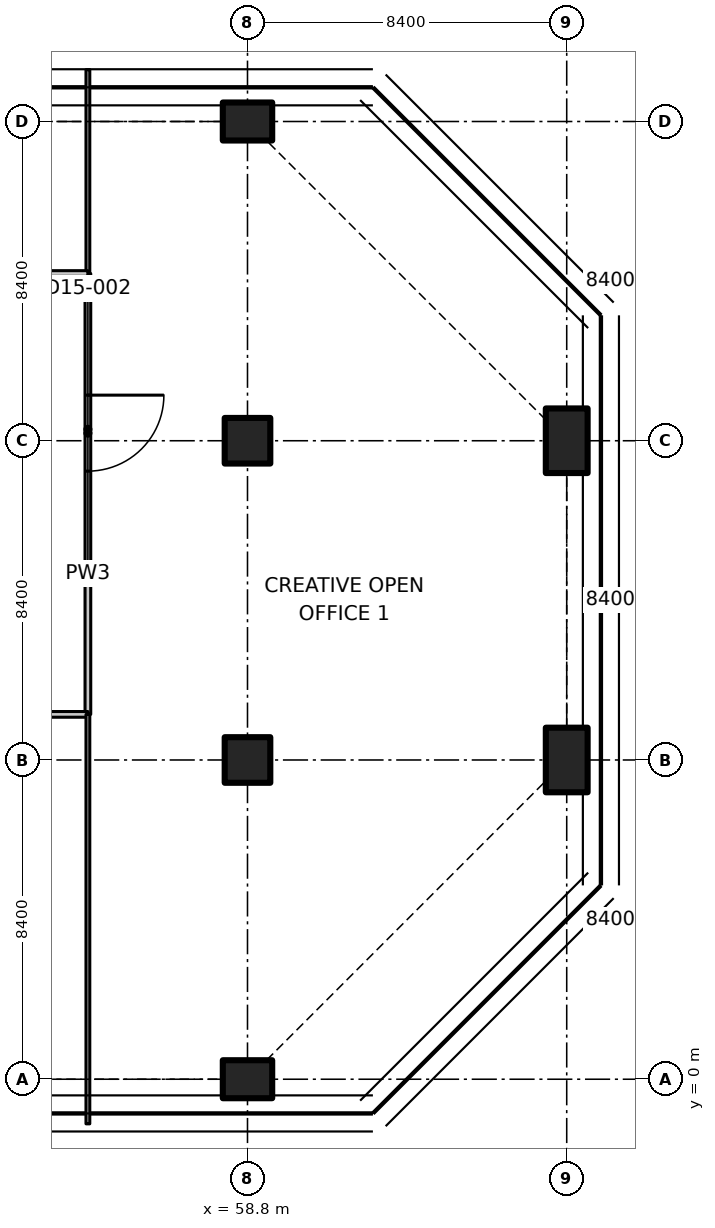
"""IFC4 building model, lengths in metres.
Left out: names, types, materials, properties, quantities, classifications, styles, units other than length and angle.
Written with IfcOpenShell. Run it as: python <this file> out.ifc"""

import sys

from ifc_helpers import new_model, si_unit, direction, frame, frame_2d, origin, origin_2d, place, context, subcontext, project, spatial, polyline, rectangle, outline, extrude, element, fill, save


model = new_model("IFC4")
c1 = context("Model", 3, precision=1e-05, world=origin(), true_north=direction((0.0, 1.0)))
c2 = subcontext(c1, "Body", "Model", "MODEL_VIEW")
j1 = project(units=[si_unit("LENGTHUNIT", "METRE"), si_unit("PLANEANGLEUNIT", "RADIAN")], contexts=[c1])
p1 = place(None, origin())
s1 = spatial("IfcSite", under=j1, at=p1, CompositionType="ELEMENT")
p2 = place(p1, origin())
s2 = spatial("IfcBuilding", under=s1, at=p2, CompositionType="ELEMENT")
p3 = place(p2, frame((0.0, 0.0, 120.5)))
s3 = spatial("IfcBuildingStorey", under=s2, at=p3, CompositionType="ELEMENT", Elevation=120.5)
p4 = place(p3, frame((58.8, 0.0, 0.0), z_axis=(0.0, 0.0, 1.0), x_axis=(0.0, 1.0, 0.0)))
e1 = element("IfcColumn", 1, at=p4, inside=s3, PredefinedType="COLUMN", context=c2, shape_type="SweptSolid", body=[
    extrude(rectangle(XDim=1.0, YDim=1.3, at=origin_2d()), origin(), (0.0, 0.0, 1.0), 3.35),
])
for number, where, z_axis, x_axis in (
    (2, (58.8, 8.4, 0.0), (0.0, 0.0, 1.0), (1.0, 0.0, 0.0)),
    (3, (58.8, 16.8, 0.0), (0.0, 0.0, 1.0), (1.0, 0.0, 0.0)),
):
    element("IfcColumn", number, at=place(p3, frame(where, z_axis=z_axis, x_axis=x_axis)), inside=s3, PredefinedType="COLUMN", context=c2, shape_type="SweptSolid", body=[
        extrude(rectangle(XDim=1.2, YDim=1.2, at=origin_2d()), origin(), (0.0, 0.0, 1.0), 3.35),
    ])
p5 = place(p3, frame((58.8, 25.2, 0.0), z_axis=(0.0, 0.0, 1.0), x_axis=(0.0, 1.0, 0.0)))
e4 = element("IfcColumn", 4, at=p5, inside=s3, PredefinedType="COLUMN", context=c2, shape_type="SweptSolid", body=[
    extrude(rectangle(XDim=1.0, YDim=1.3, at=origin_2d()), origin(), (0.0, 0.0, 1.0), 3.35),
])
for number, where, z_axis, x_axis in (
    (5, (67.2, 8.4, 0.0), (0.0, 0.0, 1.0), (1.0, 0.0, 0.0)),
    (6, (67.2, 16.8, 0.0), (0.0, 0.0, 1.0), (1.0, 0.0, 0.0)),
):
    element("IfcColumn", number, at=place(p3, frame(where, z_axis=z_axis, x_axis=x_axis)), inside=s3, PredefinedType="COLUMN", context=c2, shape_type="SweptSolid", body=[
        extrude(rectangle(XDim=1.1, YDim=1.7, at=origin_2d()), origin(), (0.0, 0.0, 1.0), 3.35),
    ])
p6 = place(p3, frame((54.6, 13.0, 0.0), z_axis=(0.0, 0.0, 1.0), x_axis=(0.0, -1.0, 0.0)))
e7 = element("IfcWall", 7, at=p6, inside=s3, PredefinedType="PARTITIONING", context=c2, shape_type="SweptSolid", body=[
    extrude(rectangle(XDim=3.4, YDim=0.15, at=frame_2d((1.7, 0.0))), origin(), (0.0, 0.0, 1.0), 3.33),
])
p7 = place(p3, frame((54.6, 9.6, 0.0), z_axis=(0.0, 0.0, 1.0), x_axis=(-1.0, 0.0, 0.0)))
e8 = element("IfcWall", 8, at=p7, inside=s3, PredefinedType="PARTITIONING", context=c2, shape_type="SweptSolid", body=[
    extrude(rectangle(XDim=4.2, YDim=0.15, at=frame_2d((2.1, 0.0))), origin(), (0.0, 0.0, 1.0), 3.33),
])
p8 = place(p7, frame((1.5, 0.0, 0.0)))
e9 = element("IfcOpeningElement", 9, at=p8, cuts=e8, PredefinedType="OPENING", context=c2, shape_type="SweptSolid", body=[
    extrude(rectangle(XDim=1.1, YDim=2.1, at=frame_2d((0.55, 1.05))), frame((0.0, 0.085, 0.0), z_axis=(0.0, -1.0, 0.0), x_axis=(1.0, 0.0, 0.0)), (0.0, 0.0, 1.0), 0.17),
])
p9 = place(p3, frame((54.6, 21.2, 0.0), z_axis=(0.0, 0.0, 1.0), x_axis=(0.0, -1.0, 0.0)))
e10 = element("IfcWall", 10, at=p9, inside=s3, PredefinedType="PARTITIONING", context=c2, shape_type="SweptSolid", body=[
    extrude(rectangle(XDim=8.2, YDim=0.15, at=frame_2d((4.1, 0.0))), origin(), (0.0, 0.0, 1.0), 3.33),
])
p10 = place(p9, frame((3.2, 0.0, 0.0)))
e11 = element("IfcOpeningElement", 11, at=p10, cuts=e10, PredefinedType="OPENING", context=c2, shape_type="SweptSolid", body=[
    extrude(rectangle(XDim=2.0, YDim=2.4, at=frame_2d((1.0, 1.2))), frame((0.0, 0.085, 0.0), z_axis=(0.0, -1.0, 0.0), x_axis=(1.0, 0.0, 0.0)), (0.0, 0.0, 1.0), 0.17),
])
p11 = place(p3, frame((54.6, -1.174, 0.0), z_axis=(0.0, 0.0, 1.0), x_axis=(0.0, 1.0, 0.0)))
e12 = element("IfcWall", 12, at=p11, inside=s3, PredefinedType="PARTITIONING", context=c2, shape_type="SweptSolid", body=[
    extrude(outline(polyline([(0.0, 0.0), (10.774, 0.0), (10.774, 3.33), (1.624, 3.33), (1.622, 2.98), (0.726, 2.98), (0.724, 3.33), (0.074, 3.33), (0.0, 3.33), (0.0, 0.0)])), frame((0.0, 0.05, 0.0), z_axis=(0.0, -1.0, 0.0), x_axis=(1.0, 0.0, 0.0)), (0.0, 0.0, 1.0), 0.1),
])
p12 = place(p3, frame((54.6, 21.2, 0.0), z_axis=(0.0, 0.0, 1.0), x_axis=(0.0, 1.0, 0.0)))
e13 = element("IfcWall", 13, at=p12, inside=s3, PredefinedType="PARTITIONING", context=c2, shape_type="SweptSolid", body=[
    extrude(outline(polyline([(0.0, 0.0), (5.365, 0.0), (5.365, 3.33), (5.1, 3.33), (4.45, 3.33), (4.448, 2.98), (3.552, 2.98), (3.55, 3.33), (0.0, 3.33), (0.0, 0.0)])), frame((0.0, 0.05, 0.0), z_axis=(0.0, -1.0, 0.0), x_axis=(1.0, 0.0, 0.0)), (0.0, 0.0, 1.0), 0.1),
])
p13 = place(p3, frame((51.0, 21.2, 0.0), z_axis=(0.0, 0.0, 1.0), x_axis=(1.0, 0.0, 0.0)))
e14 = element("IfcWall", 14, at=p13, inside=s3, PredefinedType="PARTITIONING", context=c2, shape_type="SweptSolid", body=[
    extrude(rectangle(XDim=3.6, YDim=0.15, at=frame_2d((1.8, 0.0))), origin(), (0.0, 0.0, 1.0), 3.33),
])
p14 = place(p10, origin())
e15 = element("IfcDoor", 15, at=p14, inside=s3, OperationType="DOUBLE_DOOR_SINGLE_SWING", PredefinedType="DOOR", context=c2, shape_type="SweptSolid", body=[
    extrude(rectangle(XDim=2.0, YDim=2.4, at=frame_2d((1.0, 1.2))), frame((0.0, 0.025, 0.0), z_axis=(0.0, -1.0, 0.0), x_axis=(1.0, 0.0, 0.0)), (0.0, 0.0, 1.0), 0.05),
])
fill(e11, e15)
save(model, sys.argv[1])
